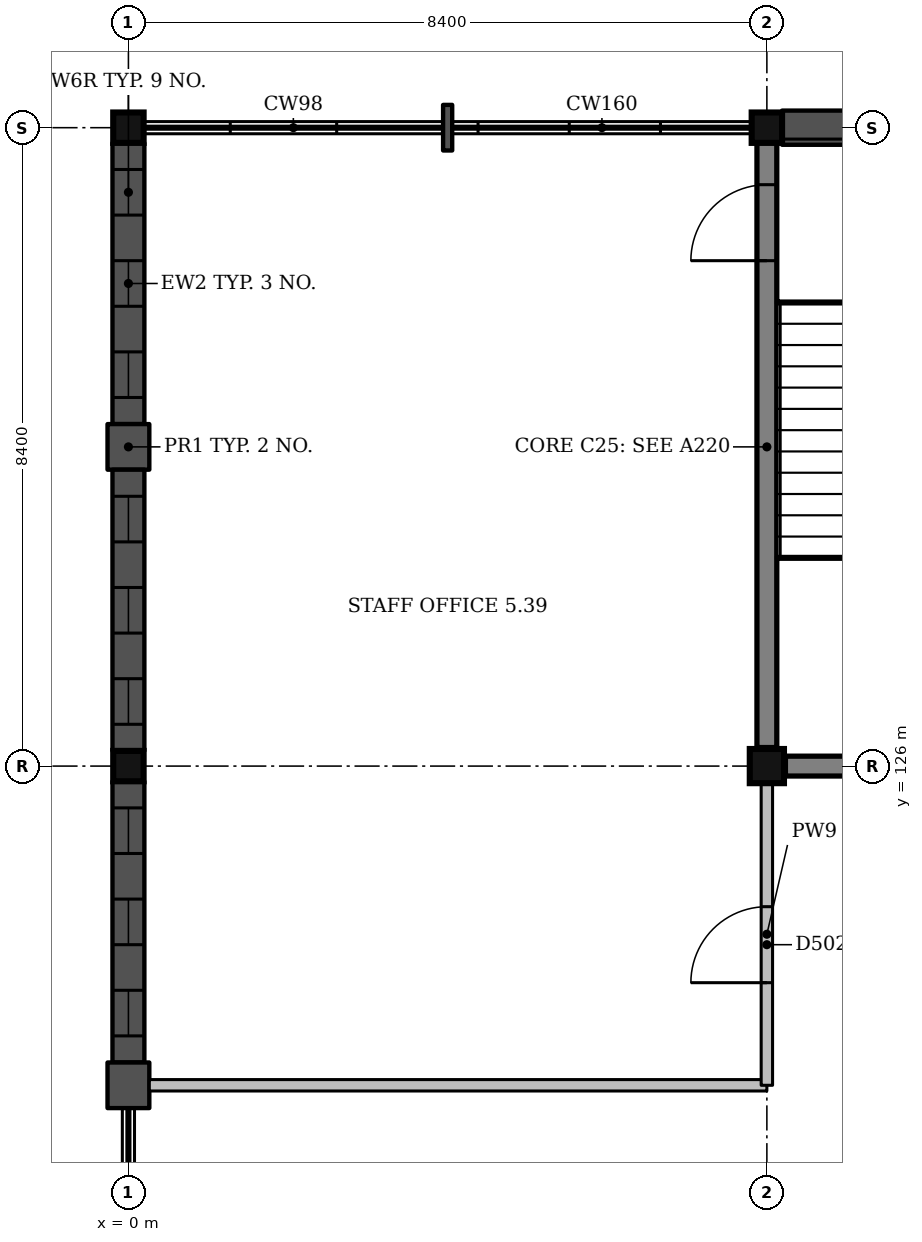
"""IFC4 building model, lengths in metres.
Left out: names, types, materials, properties, quantities, classifications, styles, units other than length and angle.
Written with IfcOpenShell. Run it as: python <this file> out.ifc"""

import sys

from ifc_helpers import new_model, si_unit, direction, frame, frame_2d, origin, origin_2d, place, context, subcontext, project, spatial, rectangle, extrude, element, fill, save


model = new_model("IFC4")
c1 = context("Model", 3, precision=1e-05, world=origin(), true_north=direction((0.0, 1.0)))
c2 = subcontext(c1, "Body", "Model", "MODEL_VIEW")
j1 = project(units=[si_unit("LENGTHUNIT", "METRE"), si_unit("PLANEANGLEUNIT", "RADIAN")], contexts=[c1])
p1 = place(None, origin())
s1 = spatial("IfcSite", under=j1, at=p1, CompositionType="ELEMENT")
p2 = place(p1, origin())
s2 = spatial("IfcBuilding", under=s1, at=p2, CompositionType="ELEMENT")
p3 = place(p2, frame((0.0, 0.0, 22.5)))
s3 = spatial("IfcBuildingStorey", under=s2, at=p3, CompositionType="ELEMENT", Elevation=22.5)
for number, where, z_axis, x_axis in (
    (1, (0.0, 126.0, 0.0), (0.0, 0.0, 1.0), (1.0, 0.0, 0.0)),
    (2, (0.0, 134.4, 0.0), (0.0, 0.0, 1.0), (1.0, 0.0, 0.0)),
):
    element("IfcColumn", number, at=place(p3, frame(where, z_axis=z_axis, x_axis=x_axis)), inside=s3, PredefinedType="COLUMN", context=c2, shape_type="SweptSolid", body=[
        extrude(rectangle(XDim=0.4, YDim=0.4, at=origin_2d()), origin(), (0.0, 0.0, 1.0), 4.5),
    ])
p4 = place(p3, frame((8.4, 126.0, 0.0), z_axis=(0.0, 0.0, 1.0), x_axis=(1.0, 0.0, 0.0)))
e3 = element("IfcColumn", 3, at=p4, inside=s3, PredefinedType="COLUMN", context=c2, shape_type="SweptSolid", body=[
    extrude(rectangle(XDim=0.45, YDim=0.45, at=origin_2d()), origin(), (0.0, 0.0, 1.0), 4.5),
])
p5 = place(p3, frame((8.4, 134.4, 0.0), z_axis=(0.0, 0.0, 1.0), x_axis=(1.0, 0.0, 0.0)))
e4 = element("IfcColumn", 4, at=p5, inside=s3, PredefinedType="COLUMN", context=c2, shape_type="SweptSolid", body=[
    extrude(rectangle(XDim=0.4, YDim=0.4, at=origin_2d()), origin(), (0.0, 0.0, 1.0), 4.5),
])
p6 = place(p3, frame((8.65, 126.0, 0.0), z_axis=(0.0, 0.0, 1.0), x_axis=(1.0, 0.0, 0.0)))
e5 = element("IfcWall", 5, at=p6, inside=s3, PredefinedType="SHEAR", context=c2, shape_type="SweptSolid", body=[
    extrude(rectangle(XDim=5.25, YDim=0.25, at=frame_2d((2.625, 0.0))), origin(), (0.0, 0.0, 1.0), 4.5),
])
p7 = place(p3, frame((8.4, 126.25, 0.0), z_axis=(0.0, 0.0, 1.0), x_axis=(0.0, 1.0, 0.0)))
e6 = element("IfcWall", 6, at=p7, inside=s3, PredefinedType="SHEAR", context=c2, shape_type="SweptSolid", body=[
    extrude(rectangle(XDim=7.95, YDim=0.25, at=frame_2d((3.975, 0.0))), origin(), (0.0, 0.0, 1.0), 4.5),
])
p8 = place(p7, frame((6.4, 0.0, 0.0)))
e7 = element("IfcOpeningElement", 7, at=p8, cuts=e6, PredefinedType="OPENING", context=c2, shape_type="SweptSolid", body=[
    extrude(rectangle(XDim=1.0, YDim=2.1, at=frame_2d((0.5, 1.05))), frame((0.0, 0.135, 0.0), z_axis=(0.0, -1.0, 0.0), x_axis=(1.0, 0.0, 0.0)), (0.0, 0.0, 1.0), 0.27),
])
p9 = place(p3, frame((11.207, 134.4, 0.0), z_axis=(0.0, 0.0, 1.0), x_axis=(-1.0, 0.0, 0.0)))
e8 = element("IfcWall", 8, at=p9, inside=s3, PredefinedType="SOLIDWALL", context=c2, shape_type="SweptSolid", body=[
    extrude(rectangle(XDim=2.607, YDim=0.45, at=frame_2d((1.303, 0.0))), origin(), (0.0, 0.0, 1.0), 3.35),
])
p10 = place(p3, frame((4.26, 134.4, 0.0), z_axis=(0.0, 0.0, 1.0), x_axis=(-1.0, 0.0, 0.0)))
e9 = element("IfcWall", 9, at=p10, inside=s3, PredefinedType="SOLIDWALL", context=c2, shape_type="SweptSolid", body=[
    extrude(rectangle(XDim=0.12, YDim=0.6, at=frame_2d((0.06, 0.0))), origin(), (0.0, 0.0, 1.0), 3.35),
])
p11 = place(p3, frame((0.0, 134.2, 0.0), z_axis=(0.0, 0.0, 1.0), x_axis=(0.0, -1.0, 0.0)))
e10 = element("IfcWall", 10, at=p11, inside=s3, PredefinedType="SOLIDWALL", context=c2, shape_type="SweptSolid", body=[
    extrude(rectangle(XDim=3.7, YDim=0.42, at=frame_2d((1.85, 0.0))), origin(), (0.0, 0.0, 1.0), 3.35),
])
p12 = place(p11, frame((0.35, 0.0, 1.0)))
e11 = element("IfcOpeningElement", 11, at=p12, cuts=e10, PredefinedType="OPENING", context=c2, shape_type="SweptSolid", body=[
    extrude(rectangle(XDim=0.6, YDim=1.8, at=frame_2d((0.3, 0.9))), frame((0.0, 0.22, 0.0), z_axis=(0.0, -1.0, 0.0), x_axis=(1.0, 0.0, 0.0)), (0.0, 0.0, 1.0), 0.44),
])
p13 = place(p11, frame((1.55, 0.0, 1.0)))
e12 = element("IfcOpeningElement", 12, at=p13, cuts=e10, PredefinedType="OPENING", context=c2, shape_type="SweptSolid", body=[
    extrude(rectangle(XDim=0.6, YDim=1.8, at=frame_2d((0.3, 0.9))), frame((0.0, 0.22, 0.0), z_axis=(0.0, -1.0, 0.0), x_axis=(1.0, 0.0, 0.0)), (0.0, 0.0, 1.0), 0.44),
])
p14 = place(p11, frame((2.75, 0.0, 1.0)))
e13 = element("IfcOpeningElement", 13, at=p14, cuts=e10, PredefinedType="OPENING", context=c2, shape_type="SweptSolid", body=[
    extrude(rectangle(XDim=0.6, YDim=1.8, at=frame_2d((0.3, 0.9))), frame((0.0, 0.22, 0.0), z_axis=(0.0, -1.0, 0.0), x_axis=(1.0, 0.0, 0.0)), (0.0, 0.0, 1.0), 0.44),
])
p15 = place(p3, frame((0.0, 130.5, 0.0), z_axis=(0.0, 0.0, 1.0), x_axis=(0.0, -1.0, 0.0)))
e14 = element("IfcWall", 14, at=p15, inside=s3, PredefinedType="SOLIDWALL", context=c2, shape_type="SweptSolid", body=[
    extrude(rectangle(XDim=0.6, YDim=0.55, at=frame_2d((0.3, 0.0))), origin(), (0.0, 0.0, 1.0), 3.35),
])
p16 = place(p3, frame((0.0, 129.9, 0.0), z_axis=(0.0, 0.0, 1.0), x_axis=(0.0, -1.0, 0.0)))
e15 = element("IfcWall", 15, at=p16, inside=s3, PredefinedType="SOLIDWALL", context=c2, shape_type="SweptSolid", body=[
    extrude(rectangle(XDim=3.7, YDim=0.42, at=frame_2d((1.85, 0.0))), origin(), (0.0, 0.0, 1.0), 3.35),
])
p17 = place(p16, frame((0.35, 0.0, 1.0)))
e16 = element("IfcOpeningElement", 16, at=p17, cuts=e15, PredefinedType="OPENING", context=c2, shape_type="SweptSolid", body=[
    extrude(rectangle(XDim=0.6, YDim=1.8, at=frame_2d((0.3, 0.9))), frame((0.0, 0.22, 0.0), z_axis=(0.0, -1.0, 0.0), x_axis=(1.0, 0.0, 0.0)), (0.0, 0.0, 1.0), 0.44),
])
p18 = place(p16, frame((1.55, 0.0, 1.0)))
e17 = element("IfcOpeningElement", 17, at=p18, cuts=e15, PredefinedType="OPENING", context=c2, shape_type="SweptSolid", body=[
    extrude(rectangle(XDim=0.6, YDim=1.8, at=frame_2d((0.3, 0.9))), frame((0.0, 0.22, 0.0), z_axis=(0.0, -1.0, 0.0), x_axis=(1.0, 0.0, 0.0)), (0.0, 0.0, 1.0), 0.44),
])
p19 = place(p16, frame((2.75, 0.0, 1.0)))
e18 = element("IfcOpeningElement", 18, at=p19, cuts=e15, PredefinedType="OPENING", context=c2, shape_type="SweptSolid", body=[
    extrude(rectangle(XDim=0.6, YDim=1.8, at=frame_2d((0.3, 0.9))), frame((0.0, 0.22, 0.0), z_axis=(0.0, -1.0, 0.0), x_axis=(1.0, 0.0, 0.0)), (0.0, 0.0, 1.0), 0.44),
])
p20 = place(p3, frame((0.0, 125.8, 0.0), z_axis=(0.0, 0.0, 1.0), x_axis=(0.0, -1.0, 0.0)))
e19 = element("IfcWall", 19, at=p20, inside=s3, PredefinedType="SOLIDWALL", context=c2, shape_type="SweptSolid", body=[
    extrude(rectangle(XDim=3.7, YDim=0.42, at=frame_2d((1.85, 0.0))), origin(), (0.0, 0.0, 1.0), 3.35),
])
p21 = place(p20, frame((0.35, 0.0, 1.0)))
e20 = element("IfcOpeningElement", 20, at=p21, cuts=e19, PredefinedType="OPENING", context=c2, shape_type="SweptSolid", body=[
    extrude(rectangle(XDim=0.6, YDim=1.8, at=frame_2d((0.3, 0.9))), frame((0.0, 0.22, 0.0), z_axis=(0.0, -1.0, 0.0), x_axis=(1.0, 0.0, 0.0)), (0.0, 0.0, 1.0), 0.44),
])
p22 = place(p20, frame((1.55, 0.0, 1.0)))
e21 = element("IfcOpeningElement", 21, at=p22, cuts=e19, PredefinedType="OPENING", context=c2, shape_type="SweptSolid", body=[
    extrude(rectangle(XDim=0.6, YDim=1.8, at=frame_2d((0.3, 0.9))), frame((0.0, 0.22, 0.0), z_axis=(0.0, -1.0, 0.0), x_axis=(1.0, 0.0, 0.0)), (0.0, 0.0, 1.0), 0.44),
])
p23 = place(p20, frame((2.75, 0.0, 1.0)))
e22 = element("IfcOpeningElement", 22, at=p23, cuts=e19, PredefinedType="OPENING", context=c2, shape_type="SweptSolid", body=[
    extrude(rectangle(XDim=0.6, YDim=1.8, at=frame_2d((0.3, 0.9))), frame((0.0, 0.22, 0.0), z_axis=(0.0, -1.0, 0.0), x_axis=(1.0, 0.0, 0.0)), (0.0, 0.0, 1.0), 0.44),
])
p24 = place(p3, frame((0.0, 122.1, 0.0), z_axis=(0.0, 0.0, 1.0), x_axis=(0.0, -1.0, 0.0)))
e23 = element("IfcWall", 23, at=p24, inside=s3, PredefinedType="SOLIDWALL", context=c2, shape_type="SweptSolid", body=[
    extrude(rectangle(XDim=0.6, YDim=0.55, at=frame_2d((0.3, 0.0))), origin(), (0.0, 0.0, 1.0), 3.35),
])
p25 = place(p3, frame((0.275, 121.8, 0.0), z_axis=(0.0, 0.0, 1.0), x_axis=(1.0, 0.0, 0.0)))
e24 = element("IfcWall", 24, at=p25, inside=s3, PredefinedType="PARTITIONING", context=c2, shape_type="SweptSolid", body=[
    extrude(rectangle(XDim=8.125, YDim=0.15, at=frame_2d((4.062, 0.0))), origin(), (0.0, 0.0, 1.0), 3.4),
])
p26 = place(p3, frame((8.4, 121.8, 0.0), z_axis=(0.0, 0.0, 1.0), x_axis=(0.0, 1.0, 0.0)))
e25 = element("IfcWall", 25, at=p26, inside=s3, PredefinedType="PARTITIONING", context=c2, shape_type="SweptSolid", body=[
    extrude(rectangle(XDim=3.975, YDim=0.15, at=frame_2d((1.987, 0.0))), origin(), (0.0, 0.0, 1.0), 3.4),
])
p27 = place(p26, frame((1.35, 0.0, 0.0)))
e26 = element("IfcOpeningElement", 26, at=p27, cuts=e25, PredefinedType="OPENING", context=c2, shape_type="SweptSolid", body=[
    extrude(rectangle(XDim=1.0, YDim=2.1, at=frame_2d((0.5, 1.05))), frame((0.0, 0.085, 0.0), z_axis=(0.0, -1.0, 0.0), x_axis=(1.0, 0.0, 0.0)), (0.0, 0.0, 1.0), 0.17),
])
p28 = place(p12, origin())
e27 = element("IfcWindow", 27, at=p28, inside=s3, PartitioningType="SINGLE_PANEL", PredefinedType="WINDOW", context=c2, shape_type="SweptSolid", body=[
    extrude(rectangle(XDim=0.6, YDim=1.8, at=frame_2d((0.3, 0.9))), frame((0.0, 0.15, 0.0), z_axis=(0.0, -1.0, 0.0), x_axis=(1.0, 0.0, 0.0)), (0.0, 0.0, 1.0), 0.06),
])
fill(e11, e27)
p29 = place(p13, origin())
e28 = element("IfcWindow", 28, at=p29, inside=s3, PartitioningType="SINGLE_PANEL", PredefinedType="WINDOW", context=c2, shape_type="SweptSolid", body=[
    extrude(rectangle(XDim=0.6, YDim=1.8, at=frame_2d((0.3, 0.9))), frame((0.0, 0.15, 0.0), z_axis=(0.0, -1.0, 0.0), x_axis=(1.0, 0.0, 0.0)), (0.0, 0.0, 1.0), 0.06),
])
fill(e12, e28)
p30 = place(p14, origin())
e29 = element("IfcWindow", 29, at=p30, inside=s3, PartitioningType="SINGLE_PANEL", PredefinedType="WINDOW", context=c2, shape_type="SweptSolid", body=[
    extrude(rectangle(XDim=0.6, YDim=1.8, at=frame_2d((0.3, 0.9))), frame((0.0, 0.15, 0.0), z_axis=(0.0, -1.0, 0.0), x_axis=(1.0, 0.0, 0.0)), (0.0, 0.0, 1.0), 0.06),
])
fill(e13, e29)
p31 = place(p17, origin())
e30 = element("IfcWindow", 30, at=p31, inside=s3, PartitioningType="SINGLE_PANEL", PredefinedType="WINDOW", context=c2, shape_type="SweptSolid", body=[
    extrude(rectangle(XDim=0.6, YDim=1.8, at=frame_2d((0.3, 0.9))), frame((0.0, 0.15, 0.0), z_axis=(0.0, -1.0, 0.0), x_axis=(1.0, 0.0, 0.0)), (0.0, 0.0, 1.0), 0.06),
])
fill(e16, e30)
p32 = place(p18, origin())
e31 = element("IfcWindow", 31, at=p32, inside=s3, PartitioningType="SINGLE_PANEL", PredefinedType="WINDOW", context=c2, shape_type="SweptSolid", body=[
    extrude(rectangle(XDim=0.6, YDim=1.8, at=frame_2d((0.3, 0.9))), frame((0.0, 0.15, 0.0), z_axis=(0.0, -1.0, 0.0), x_axis=(1.0, 0.0, 0.0)), (0.0, 0.0, 1.0), 0.06),
])
fill(e17, e31)
p33 = place(p19, origin())
e32 = element("IfcWindow", 32, at=p33, inside=s3, PartitioningType="SINGLE_PANEL", PredefinedType="WINDOW", context=c2, shape_type="SweptSolid", body=[
    extrude(rectangle(XDim=0.6, YDim=1.8, at=frame_2d((0.3, 0.9))), frame((0.0, 0.15, 0.0), z_axis=(0.0, -1.0, 0.0), x_axis=(1.0, 0.0, 0.0)), (0.0, 0.0, 1.0), 0.06),
])
fill(e18, e32)
p34 = place(p21, origin())
e33 = element("IfcWindow", 33, at=p34, inside=s3, PartitioningType="SINGLE_PANEL", PredefinedType="WINDOW", context=c2, shape_type="SweptSolid", body=[
    extrude(rectangle(XDim=0.6, YDim=1.8, at=frame_2d((0.3, 0.9))), frame((0.0, 0.15, 0.0), z_axis=(0.0, -1.0, 0.0), x_axis=(1.0, 0.0, 0.0)), (0.0, 0.0, 1.0), 0.06),
])
fill(e20, e33)
p35 = place(p22, origin())
e34 = element("IfcWindow", 34, at=p35, inside=s3, PartitioningType="SINGLE_PANEL", PredefinedType="WINDOW", context=c2, shape_type="SweptSolid", body=[
    extrude(rectangle(XDim=0.6, YDim=1.8, at=frame_2d((0.3, 0.9))), frame((0.0, 0.15, 0.0), z_axis=(0.0, -1.0, 0.0), x_axis=(1.0, 0.0, 0.0)), (0.0, 0.0, 1.0), 0.06),
])
fill(e21, e34)
p36 = place(p23, origin())
e35 = element("IfcWindow", 35, at=p36, inside=s3, PartitioningType="SINGLE_PANEL", PredefinedType="WINDOW", context=c2, shape_type="SweptSolid", body=[
    extrude(rectangle(XDim=0.6, YDim=1.8, at=frame_2d((0.3, 0.9))), frame((0.0, 0.15, 0.0), z_axis=(0.0, -1.0, 0.0), x_axis=(1.0, 0.0, 0.0)), (0.0, 0.0, 1.0), 0.06),
])
fill(e22, e35)
p37 = place(p27, origin())
e36 = element("IfcDoor", 36, at=p37, inside=s3, OperationType="SINGLE_SWING_LEFT", PredefinedType="DOOR", context=c2, shape_type="SweptSolid", body=[
    extrude(rectangle(XDim=1.0, YDim=2.1, at=frame_2d((0.5, 1.05))), frame((0.0, 0.025, 0.0), z_axis=(0.0, -1.0, 0.0), x_axis=(1.0, 0.0, 0.0)), (0.0, 0.0, 1.0), 0.05),
])
fill(e26, e36)
p38 = place(p8, origin())
e37 = element("IfcDoor", 37, at=p38, inside=s3, OperationType="SINGLE_SWING_LEFT", PredefinedType="DOOR", context=c2, shape_type="SweptSolid", body=[
    extrude(rectangle(XDim=1.0, YDim=2.1, at=frame_2d((0.5, 1.05))), frame((0.0, 0.025, 0.0), z_axis=(0.0, -1.0, 0.0), x_axis=(1.0, 0.0, 0.0)), (0.0, 0.0, 1.0), 0.05),
])
fill(e7, e37)
save(model, sys.argv[1])
